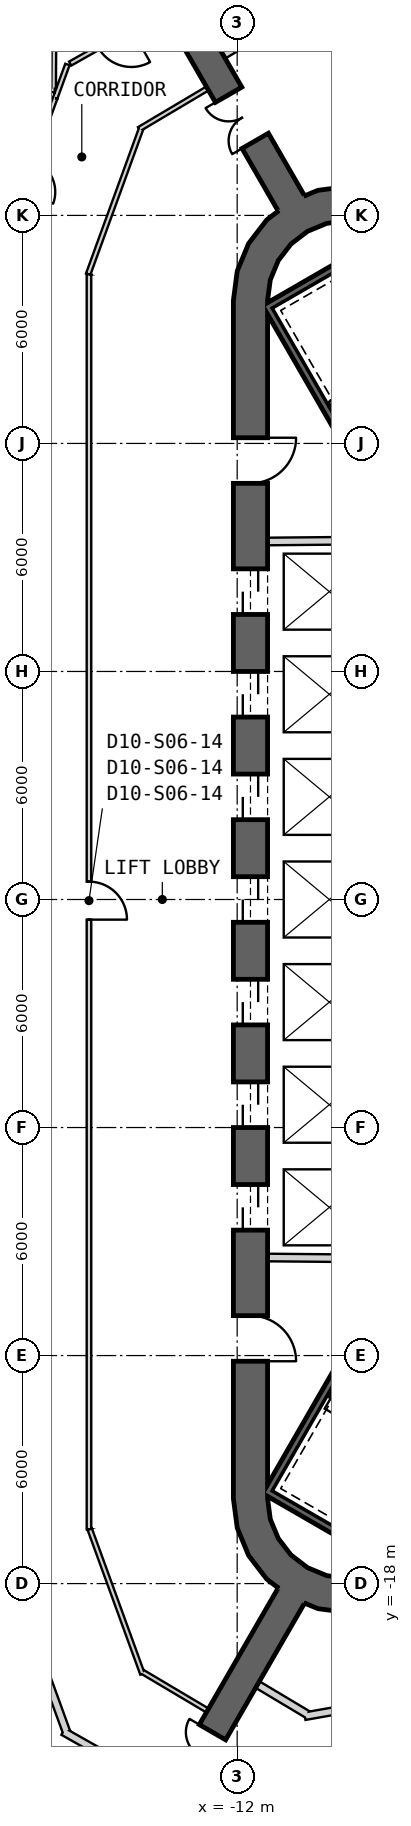
"""IFC4 building model, lengths in metres.
Left out: names, types, materials, properties, quantities, classifications, styles, units other than length and angle.
Written with IfcOpenShell. Run it as: python <this file> out.ifc"""

import sys

from ifc_helpers import new_model, si_unit, direction, frame, frame_2d, origin, place, context, subcontext, project, spatial, polyline, rectangle, outline, extrude, element, fill, save


model = new_model("IFC4")
c1 = context("Model", 3, precision=1e-05, world=origin(), true_north=direction((0.0, 1.0)))
c2 = subcontext(c1, "Body", "Model", "MODEL_VIEW")
j1 = project(units=[si_unit("LENGTHUNIT", "METRE"), si_unit("PLANEANGLEUNIT", "RADIAN")], contexts=[c1])
p1 = place(None, origin())
s1 = spatial("IfcSite", under=j1, at=p1, CompositionType="ELEMENT")
p2 = place(p1, origin())
s2 = spatial("IfcBuilding", under=s1, at=p2, CompositionType="ELEMENT")
p3 = place(p2, frame((0.0, 0.0, 119.3)))
s3 = spatial("IfcBuildingStorey", under=s2, at=p3, CompositionType="ELEMENT", Elevation=119.3)
p4 = place(p3, frame((-11.65, 15.762, 0.0), z_axis=(0.0, 0.0, 1.0), x_axis=(0.0, -1.0, 0.0)))
e1 = element("IfcWall", 1, at=p4, inside=s3, PredefinedType="SHEAR", context=c2, shape_type="SweptSolid", body=[
    extrude(rectangle(XDim=31.523, YDim=0.9, at=frame_2d((15.762, 0.0))), origin(), (0.0, 0.0, 1.0), 4.1),
])
p5 = place(p4, frame((7.062, 0.0, 0.0)))
e2 = element("IfcOpeningElement", 2, at=p5, cuts=e1, PredefinedType="OPENING", context=c2, shape_type="SweptSolid", body=[
    extrude(rectangle(XDim=1.2, YDim=2.4, at=frame_2d((0.6, 1.2))), frame((0.0, 0.46, 0.0), z_axis=(0.0, -1.0, 0.0), x_axis=(1.0, 0.0, 0.0)), (0.0, 0.0, 1.0), 0.92),
])
p6 = place(p4, frame((9.762, 0.0, 0.0)))
e3 = element("IfcOpeningElement", 3, at=p6, cuts=e1, PredefinedType="OPENING", context=c2, shape_type="SweptSolid", body=[
    extrude(rectangle(XDim=1.2, YDim=2.4, at=frame_2d((0.6, 1.2))), frame((0.0, 0.46, 0.0), z_axis=(0.0, -1.0, 0.0), x_axis=(1.0, 0.0, 0.0)), (0.0, 0.0, 1.0), 0.92),
])
p7 = place(p4, frame((12.462, 0.0, 0.0)))
e4 = element("IfcOpeningElement", 4, at=p7, cuts=e1, PredefinedType="OPENING", context=c2, shape_type="SweptSolid", body=[
    extrude(rectangle(XDim=1.2, YDim=2.4, at=frame_2d((0.6, 1.2))), frame((0.0, 0.46, 0.0), z_axis=(0.0, -1.0, 0.0), x_axis=(1.0, 0.0, 0.0)), (0.0, 0.0, 1.0), 0.92),
])
p8 = place(p4, frame((15.162, 0.0, 0.0)))
e5 = element("IfcOpeningElement", 5, at=p8, cuts=e1, PredefinedType="OPENING", context=c2, shape_type="SweptSolid", body=[
    extrude(rectangle(XDim=1.2, YDim=2.4, at=frame_2d((0.6, 1.2))), frame((0.0, 0.46, 0.0), z_axis=(0.0, -1.0, 0.0), x_axis=(1.0, 0.0, 0.0)), (0.0, 0.0, 1.0), 0.92),
])
p9 = place(p4, frame((17.862, 0.0, 0.0)))
e6 = element("IfcOpeningElement", 6, at=p9, cuts=e1, PredefinedType="OPENING", context=c2, shape_type="SweptSolid", body=[
    extrude(rectangle(XDim=1.2, YDim=2.4, at=frame_2d((0.6, 1.2))), frame((0.0, 0.46, 0.0), z_axis=(0.0, -1.0, 0.0), x_axis=(1.0, 0.0, 0.0)), (0.0, 0.0, 1.0), 0.92),
])
p10 = place(p4, frame((20.562, 0.0, 0.0)))
e7 = element("IfcOpeningElement", 7, at=p10, cuts=e1, PredefinedType="OPENING", context=c2, shape_type="SweptSolid", body=[
    extrude(rectangle(XDim=1.2, YDim=2.4, at=frame_2d((0.6, 1.2))), frame((0.0, 0.46, 0.0), z_axis=(0.0, -1.0, 0.0), x_axis=(1.0, 0.0, 0.0)), (0.0, 0.0, 1.0), 0.92),
])
p11 = place(p4, frame((23.262, 0.0, 0.0)))
e8 = element("IfcOpeningElement", 8, at=p11, cuts=e1, PredefinedType="OPENING", context=c2, shape_type="SweptSolid", body=[
    extrude(rectangle(XDim=1.2, YDim=2.4, at=frame_2d((0.6, 1.2))), frame((0.0, 0.46, 0.0), z_axis=(0.0, -1.0, 0.0), x_axis=(1.0, 0.0, 0.0)), (0.0, 0.0, 1.0), 0.92),
])
p12 = place(p4, frame((3.612, 0.0, 0.0)))
e9 = element("IfcOpeningElement", 9, at=p12, cuts=e1, PredefinedType="OPENING", context=c2, shape_type="SweptSolid", body=[
    extrude(rectangle(XDim=1.2, YDim=2.4, at=frame_2d((0.6, 1.2))), frame((0.0, 0.46, 0.0), z_axis=(0.0, -1.0, 0.0), x_axis=(1.0, 0.0, 0.0)), (0.0, 0.0, 1.0), 0.92),
])
p13 = place(p4, frame((26.712, 0.0, 0.0)))
e10 = element("IfcOpeningElement", 10, at=p13, cuts=e1, PredefinedType="OPENING", context=c2, shape_type="SweptSolid", body=[
    extrude(rectangle(XDim=1.2, YDim=2.4, at=frame_2d((0.6, 1.2))), frame((0.0, 0.46, 0.0), z_axis=(0.0, -1.0, 0.0), x_axis=(1.0, 0.0, 0.0)), (0.0, 0.0, 1.0), 0.92),
])
p14 = place(p3, origin())
e11 = element("IfcWall", 11, at=p14, inside=s3, PredefinedType="SHEAR", context=c2, shape_type="SweptSolid", body=[
    extrude(outline(polyline([(-7.6, 18.36), (-8.323, 18.659), (-9.1, 18.762), (-9.876, 18.659), (-10.6, 18.36), (-11.221, 17.883), (-11.698, 17.262), (-11.998, 16.538), (-12.1, 15.762), (-11.2, 15.762), (-11.128, 16.305), (-10.919, 16.812), (-10.585, 17.247), (-10.15, 17.58), (-9.644, 17.79), (-9.1, 17.862), (-8.556, 17.79), (-8.05, 17.58), (-7.6, 18.36)])), origin(), (0.0, 0.0, 1.0), 4.1),
])
p15 = place(p3, origin())
e12 = element("IfcWall", 12, at=p15, inside=s3, PredefinedType="SHEAR", context=c2, shape_type="SweptSolid", body=[
    extrude(outline(polyline([(-12.1, -15.762), (-11.998, -16.538), (-11.698, -17.262), (-11.221, -17.883), (-10.6, -18.36), (-9.876, -18.659), (-9.1, -18.762), (-8.323, -18.659), (-7.6, -18.36), (-8.05, -17.58), (-8.556, -17.79), (-9.1, -17.862), (-9.644, -17.79), (-10.15, -17.58), (-10.585, -17.247), (-10.919, -16.812), (-11.128, -16.305), (-11.2, -15.762), (-12.1, -15.762)])), origin(), (0.0, 0.0, 1.0), 4.1),
])
p16 = place(p3, frame((-10.575, 18.316, 0.0), z_axis=(0.0, 0.0, 1.0), x_axis=(-0.500008359956, 0.866020577108, 0.0)))
e13 = element("IfcWall", 13, at=p16, inside=s3, PredefinedType="SHEAR", context=c2, shape_type="SweptSolid", body=[
    extrude(rectangle(XDim=12.812, YDim=0.8, at=frame_2d((6.406, 0.0))), origin(), (0.0, 0.0, 1.0), 4.1),
])
p17 = place(p16, frame((1.9, 0.0, 0.0)))
e14 = element("IfcOpeningElement", 14, at=p17, cuts=e13, PredefinedType="OPENING", context=c2, shape_type="SweptSolid", body=[
    extrude(rectangle(XDim=1.4, YDim=2.4, at=frame_2d((0.7, 1.2))), frame((0.0, 0.41, 0.0), z_axis=(0.0, -1.0, 0.0), x_axis=(1.0, 0.0, 0.0)), (0.0, 0.0, 1.0), 0.82),
])
p18 = place(p3, frame((-10.575, -18.316, 0.0), z_axis=(0.0, 0.0, 1.0), x_axis=(-0.500008359956, -0.866020577108, 0.0)))
e15 = element("IfcWall", 15, at=p18, inside=s3, PredefinedType="SHEAR", context=c2, shape_type="SweptSolid", body=[
    extrude(rectangle(XDim=12.812, YDim=0.8, at=frame_2d((6.406, 0.0))), origin(), (0.0, 0.0, 1.0), 4.1),
])
p19 = place(p18, frame((4.15, 0.0, 0.0)))
e16 = element("IfcOpeningElement", 16, at=p19, cuts=e15, PredefinedType="OPENING", context=c2, shape_type="SweptSolid", body=[
    extrude(rectangle(XDim=1.4, YDim=2.4, at=frame_2d((0.7, 1.2))), frame((0.0, 0.41, 0.0), z_axis=(0.0, -1.0, 0.0), x_axis=(1.0, 0.0, 0.0)), (0.0, 0.0, 1.0), 0.82),
])
p20 = place(p3, frame((-11.2, 9.42, 0.0), z_axis=(0.0, 0.0, 1.0), x_axis=(0.999957167047, 0.009255488683, 0.0)))
e17 = element("IfcWall", 17, at=p20, inside=s3, PredefinedType="PLUMBINGWALL", context=c2, shape_type="SweptSolid", body=[
    extrude(rectangle(XDim=3.35, YDim=0.2, at=frame_2d((1.675, 0.0))), origin(), (0.0, 0.0, 1.0), 3.8),
])
p21 = place(p3, frame((-8.05, -9.449, 0.0), z_axis=(0.0, 0.0, 1.0), x_axis=(-0.999957467379, 0.009222983926, 0.0)))
e18 = element("IfcWall", 18, at=p21, inside=s3, PredefinedType="PLUMBINGWALL", context=c2, shape_type="SweptSolid", body=[
    extrude(rectangle(XDim=3.15, YDim=0.2, at=frame_2d((1.575, 0.0))), origin(), (0.0, 0.0, 1.0), 3.8),
])
p22 = place(p3, frame((-11.245, 15.678, -0.3), z_axis=(0.0, 0.0, 1.0), x_axis=(0.499977274689, -0.866038523851, 0.0)))
e19 = element("IfcWall", 19, at=p22, inside=s3, PredefinedType="SHEAR", context=c2, shape_type="SweptSolid", body=[
    extrude(rectangle(XDim=8.1, YDim=0.2, at=frame_2d((4.05, 0.0))), origin(), (0.0, 0.0, 1.0), 4.1),
])
for number, where, z_axis, x_axis in (
    (20, (-7.818, 17.541, -0.3), (0.0, 0.0, 1.0), (-0.866, -0.5, 0.0)),
    (21, (-11.282, -15.541, -0.3), (0.0, 0.0, 1.0), (0.866, -0.5, 0.0)),
):
    element("IfcWall", number, at=place(p3, frame(where, z_axis=z_axis, x_axis=x_axis)), inside=s3, PredefinedType="SHEAR", context=c2, shape_type="SweptSolid", body=[
        extrude(rectangle(XDim=3.8, YDim=0.2, at=frame_2d((1.9, 0.0))), origin(), (0.0, 0.0, 1.0), 4.1),
    ])
p23 = place(p3, frame((-7.196, -8.663, -0.3), z_axis=(0.0, 0.0, 1.0), x_axis=(-0.499997992926, -0.866026562566, 0.0)))
e22 = element("IfcWall", 22, at=p23, inside=s3, PredefinedType="SHEAR", context=c2, shape_type="SweptSolid", body=[
    extrude(rectangle(XDim=7.9, YDim=0.2, at=frame_2d((3.95, 0.0))), origin(), (0.0, 0.0, 1.0), 4.1),
])
p24 = place(p3, frame((-12.782, 21.339, 0.0), z_axis=(0.0, 0.0, 1.0), x_axis=(-0.859769901207, -0.510681619973, 0.0)))
e23 = element("IfcWall", 23, at=p24, inside=s3, PredefinedType="PARTITIONING", context=c2, shape_type="SweptSolid", body=[
    extrude(rectangle(XDim=2.093, YDim=0.12, at=frame_2d((1.046, 0.0))), origin(), (0.0, 0.0, 1.0), 3.8),
])
p25 = place(p3, frame((-14.528, 20.282, 0.0), z_axis=(0.0, 0.0, 1.0), x_axis=(-0.341969257767, -0.939711140054, 0.0)))
e24 = element("IfcWall", 24, at=p25, inside=s3, PredefinedType="PARTITIONING", context=c2, shape_type="SweptSolid", body=[
    extrude(rectangle(XDim=4.073, YDim=0.12, at=frame_2d((2.037, 0.0))), origin(), (0.0, 0.0, 1.0), 2.88),
])
p26 = place(p3, frame((-15.9, 16.451, 0.0), z_axis=(0.0, 0.0, 1.0), x_axis=(0.0, -1.0, 0.0)))
e25 = element("IfcWall", 25, at=p26, inside=s3, PredefinedType="PARTITIONING", context=c2, shape_type="SweptSolid", body=[
    extrude(rectangle(XDim=33.022, YDim=0.12, at=frame_2d((16.511, 0.0))), origin(), (0.0, 0.0, 1.0), 2.98),
])
p27 = place(p26, frame((15.981, 0.0, 0.0)))
e26 = element("IfcOpeningElement", 26, at=p27, cuts=e25, PredefinedType="OPENING", context=c2, shape_type="SweptSolid", body=[
    extrude(rectangle(XDim=1.0, YDim=2.1, at=frame_2d((0.5, 1.05))), frame((0.0, 0.07, 0.0), z_axis=(0.0, -1.0, 0.0), x_axis=(1.0, 0.0, 0.0)), (0.0, 0.0, 1.0), 0.14),
])
p28 = place(p3, frame((-15.879, -16.567, 0.0), z_axis=(0.0, 0.0, 1.0), x_axis=(0.341999322503, -0.939700198685, 0.0)))
e27 = element("IfcWall", 27, at=p28, inside=s3, PredefinedType="PARTITIONING", context=c2, shape_type="SweptSolid", body=[
    extrude(rectangle(XDim=4.054, YDim=0.12, at=frame_2d((2.027, 0.0))), origin(), (0.0, 0.0, 1.0), 2.88),
])
p29 = place(p3, frame((-14.494, -20.322, 0.0), z_axis=(0.0, 0.0, 1.0), x_axis=(0.859745408261, -0.510722853389, 0.0)))
e28 = element("IfcWall", 28, at=p29, inside=s3, PredefinedType="PARTITIONING", context=c2, shape_type="SweptSolid", body=[
    extrude(rectangle(XDim=1.991, YDim=0.12, at=frame_2d((0.996, 0.0))), origin(), (0.0, 0.0, 1.0), 3.8),
])
p30 = place(p3, frame((-16.576, -21.892, 0.0), z_axis=(0.0, 0.0, 1.0), x_axis=(0.870559817111, -0.492062602553, 0.0)))
e29 = element("IfcWall", 29, at=p30, inside=s3, PredefinedType="PARTITIONING", context=c2, shape_type="SweptSolid", body=[
    extrude(rectangle(XDim=3.01, YDim=0.2, at=frame_2d((1.505, 0.0))), origin(), (0.0, 0.0, 1.0), 3.8),
])
p31 = place(p3, frame((-18.334, -16.84, 0.0), z_axis=(0.0, 0.0, 1.0), x_axis=(0.342015877493, -0.939694173411, 0.0)))
e30 = element("IfcWall", 30, at=p31, inside=s3, PredefinedType="PARTITIONING", context=c2, shape_type="SweptSolid", body=[
    extrude(rectangle(XDim=5.389, YDim=0.2, at=frame_2d((2.694, 0.0))), origin(), (0.0, 0.0, 1.0), 2.88),
])
p32 = place(p3, frame((-16.467, 21.97, 0.0), z_axis=(0.0, 0.0, 1.0), x_axis=(-0.341973086836, -0.939709746613, 0.0)))
e31 = element("IfcWall", 31, at=p32, inside=s3, PredefinedType="PARTITIONING", context=c2, shape_type="SweptSolid", body=[
    extrude(rectangle(XDim=0.937, YDim=0.12, at=frame_2d((0.469, 0.0))), origin(), (0.0, 0.0, 1.0), 2.88),
])
p33 = place(p3, frame((-16.788, 21.09, 0.0), z_axis=(0.0, 0.0, 1.0), x_axis=(-0.342035154905, -0.939687156882, 0.0)))
e32 = element("IfcWall", 32, at=p33, inside=s3, PredefinedType="PARTITIONING", context=c2, shape_type="SweptSolid", body=[
    extrude(rectangle(XDim=4.362, YDim=0.12, at=frame_2d((2.181, 0.0))), origin(), (0.0, 0.0, 1.0), 2.98),
])
p34 = place(p33, frame((1.731, 0.0, 0.0)))
e33 = element("IfcOpeningElement", 33, at=p34, cuts=e32, PredefinedType="OPENING", context=c2, shape_type="SweptSolid", body=[
    extrude(rectangle(XDim=0.9, YDim=2.1, at=frame_2d((0.45, 1.05))), frame((0.0, 0.07, 0.0), z_axis=(0.0, -1.0, 0.0), x_axis=(1.0, 0.0, 0.0)), (0.0, 0.0, 1.0), 0.14),
])
p35 = place(p3, frame((-13.956, 23.373, 0.0), z_axis=(0.0, 0.0, 1.0), x_axis=(-0.870551471841, -0.492077366757, 0.0)))
e34 = element("IfcWall", 34, at=p35, inside=s3, PredefinedType="PARTITIONING", context=c2, shape_type="SweptSolid", body=[
    extrude(rectangle(XDim=2.8, YDim=0.12, at=frame_2d((1.4, 0.0))), origin(), (0.0, 0.0, 1.0), 3.8),
])
p36 = place(p35, frame((0.95, 0.0, 0.0)))
e35 = element("IfcOpeningElement", 35, at=p36, cuts=e34, PredefinedType="OPENING", context=c2, shape_type="SweptSolid", body=[
    extrude(rectangle(XDim=1.0, YDim=2.1, at=frame_2d((0.5, 1.05))), frame((0.0, 0.07, 0.0), z_axis=(0.0, -1.0, 0.0), x_axis=(1.0, 0.0, 0.0)), (0.0, 0.0, 1.0), 0.14),
])
p37 = place(p3, frame((-10.339, 23.415, 0.0), z_axis=(0.0, 0.0, 1.0), x_axis=(-0.860316803263, -0.509759745393, 0.0)))
e36 = element("IfcWall", 36, at=p37, inside=s3, PredefinedType="PARTITIONING", context=c2, shape_type="SweptSolid", body=[
    extrude(rectangle(XDim=2.354, YDim=0.2, at=frame_2d((1.177, 0.0))), origin(), (0.0, 0.0, 1.0), 3.8),
])
p38 = place(p3, frame((-10.22, -21.49, 0.0), z_axis=(0.0, 0.0, 1.0), x_axis=(0.984805188344, 0.173662721995, 0.0)))
e37 = element("IfcWall", 37, at=p38, inside=s3, PredefinedType="PARTITIONING", context=c2, shape_type="SweptSolid", body=[
    extrude(rectangle(XDim=3.408, YDim=0.2, at=frame_2d((1.704, 0.0))), origin(), (0.0, 0.0, 1.0), 2.88),
])
p39 = place(p3, frame((-11.465, -20.657, 0.0), z_axis=(0.0, 0.0, 1.0), x_axis=(0.858376755127, -0.513019830276, 0.0)))
e38 = element("IfcWall", 38, at=p39, inside=s3, PredefinedType="PARTITIONING", context=c2, shape_type="SweptSolid", body=[
    extrude(rectangle(XDim=1.533, YDim=0.2, at=frame_2d((0.767, 0.0))), origin(), (0.0, 0.0, 1.0), 3.8),
])
p40 = place(p3, frame((-16.8, 21.302, 0.0), z_axis=(0.0, 0.0, 1.0), x_axis=(-1.0, 0.0, 0.0)))
e39 = element("IfcWall", 39, at=p40, inside=s3, PredefinedType="PARTITIONING", context=c2, shape_type="SweptSolid", body=[
    extrude(rectangle(XDim=5.95, YDim=0.12, at=frame_2d((2.975, 0.0))), origin(), (0.0, 0.0, 1.0), 2.98),
])
p41 = place(p40, frame((2.525, 0.0, 0.0)))
e40 = element("IfcOpeningElement", 40, at=p41, cuts=e39, PredefinedType="OPENING", context=c2, shape_type="SweptSolid", body=[
    extrude(rectangle(XDim=0.9, YDim=2.1, at=frame_2d((0.45, 1.05))), frame((0.0, 0.07, 0.0), z_axis=(0.0, -1.0, 0.0), x_axis=(1.0, 0.0, 0.0)), (0.0, 0.0, 1.0), 0.14),
])
p42 = place(p3, frame((-16.83, 21.332, 0.0), z_axis=(0.0, 0.0, 1.0), x_axis=(0.006971081403, 0.999975701717, 0.0)))
e41 = element("IfcWall", 41, at=p42, inside=s3, PredefinedType="PARTITIONING", context=c2, shape_type="SweptSolid", body=[
    extrude(rectangle(XDim=4.238, YDim=0.12, at=frame_2d((2.119, 0.0))), origin(), (0.0, 0.0, 1.0), 2.88),
])
p43 = place(p27, origin())
e42 = element("IfcDoor", 42, at=p43, inside=s3, OperationType="SINGLE_SWING_RIGHT", PredefinedType="NOTDEFINED", context=c2, shape_type="SweptSolid", body=[
    extrude(rectangle(XDim=1.0, YDim=2.1, at=frame_2d((0.5, 1.05))), frame((0.0, 0.025, 0.0), z_axis=(0.0, -1.0, 0.0), x_axis=(1.0, 0.0, 0.0)), (0.0, 0.0, 1.0), 0.05),
])
fill(e26, e42)
p44 = place(p5, origin())
e43 = element("IfcDoor", 43, at=p44, inside=s3, OperationType="SLIDING_TO_LEFT", PredefinedType="USERDEFINED", context=c2, shape_type="SweptSolid", body=[
    extrude(rectangle(XDim=1.2, YDim=2.4, at=frame_2d((0.6, 1.2))), frame((0.0, 0.025, 0.0), z_axis=(0.0, -1.0, 0.0), x_axis=(1.0, 0.0, 0.0)), (0.0, 0.0, 1.0), 0.05),
])
fill(e2, e43)
p45 = place(p6, origin())
e44 = element("IfcDoor", 44, at=p45, inside=s3, OperationType="SLIDING_TO_LEFT", PredefinedType="USERDEFINED", context=c2, shape_type="SweptSolid", body=[
    extrude(rectangle(XDim=1.2, YDim=2.4, at=frame_2d((0.6, 1.2))), frame((0.0, 0.025, 0.0), z_axis=(0.0, -1.0, 0.0), x_axis=(1.0, 0.0, 0.0)), (0.0, 0.0, 1.0), 0.05),
])
fill(e3, e44)
p46 = place(p7, origin())
e45 = element("IfcDoor", 45, at=p46, inside=s3, OperationType="SLIDING_TO_LEFT", PredefinedType="USERDEFINED", context=c2, shape_type="SweptSolid", body=[
    extrude(rectangle(XDim=1.2, YDim=2.4, at=frame_2d((0.6, 1.2))), frame((0.0, 0.025, 0.0), z_axis=(0.0, -1.0, 0.0), x_axis=(1.0, 0.0, 0.0)), (0.0, 0.0, 1.0), 0.05),
])
fill(e4, e45)
p47 = place(p8, origin())
e46 = element("IfcDoor", 46, at=p47, inside=s3, OperationType="SLIDING_TO_LEFT", PredefinedType="USERDEFINED", context=c2, shape_type="SweptSolid", body=[
    extrude(rectangle(XDim=1.2, YDim=2.4, at=frame_2d((0.6, 1.2))), frame((0.0, 0.025, 0.0), z_axis=(0.0, -1.0, 0.0), x_axis=(1.0, 0.0, 0.0)), (0.0, 0.0, 1.0), 0.05),
])
fill(e5, e46)
p48 = place(p9, origin())
e47 = element("IfcDoor", 47, at=p48, inside=s3, OperationType="SLIDING_TO_LEFT", PredefinedType="USERDEFINED", context=c2, shape_type="SweptSolid", body=[
    extrude(rectangle(XDim=1.2, YDim=2.4, at=frame_2d((0.6, 1.2))), frame((0.0, 0.025, 0.0), z_axis=(0.0, -1.0, 0.0), x_axis=(1.0, 0.0, 0.0)), (0.0, 0.0, 1.0), 0.05),
])
fill(e6, e47)
p49 = place(p10, origin())
e48 = element("IfcDoor", 48, at=p49, inside=s3, OperationType="SLIDING_TO_LEFT", PredefinedType="USERDEFINED", context=c2, shape_type="SweptSolid", body=[
    extrude(rectangle(XDim=1.2, YDim=2.4, at=frame_2d((0.6, 1.2))), frame((0.0, 0.025, 0.0), z_axis=(0.0, -1.0, 0.0), x_axis=(1.0, 0.0, 0.0)), (0.0, 0.0, 1.0), 0.05),
])
fill(e7, e48)
p50 = place(p11, origin())
e49 = element("IfcDoor", 49, at=p50, inside=s3, OperationType="SLIDING_TO_LEFT", PredefinedType="USERDEFINED", context=c2, shape_type="SweptSolid", body=[
    extrude(rectangle(XDim=1.2, YDim=2.4, at=frame_2d((0.6, 1.2))), frame((0.0, 0.025, 0.0), z_axis=(0.0, -1.0, 0.0), x_axis=(1.0, 0.0, 0.0)), (0.0, 0.0, 1.0), 0.05),
])
fill(e8, e49)
p51 = place(p12, origin())
e50 = element("IfcDoor", 50, at=p51, inside=s3, OperationType="SINGLE_SWING_RIGHT", PredefinedType="USERDEFINED", context=c2, shape_type="SweptSolid", body=[
    extrude(rectangle(XDim=1.2, YDim=2.4, at=frame_2d((0.6, 1.2))), frame((0.0, 0.025, 0.0), z_axis=(0.0, -1.0, 0.0), x_axis=(1.0, 0.0, 0.0)), (0.0, 0.0, 1.0), 0.05),
])
fill(e9, e50)
p52 = place(p13, origin())
e51 = element("IfcDoor", 51, at=p52, inside=s3, OperationType="SINGLE_SWING_RIGHT", PredefinedType="USERDEFINED", context=c2, shape_type="SweptSolid", body=[
    extrude(rectangle(XDim=1.2, YDim=2.4, at=frame_2d((0.6, 1.2))), frame((0.0, 0.025, 0.0), z_axis=(0.0, -1.0, 0.0), x_axis=(1.0, 0.0, 0.0)), (0.0, 0.0, 1.0), 0.05),
])
fill(e10, e51)
p53 = place(p17, origin())
e52 = element("IfcDoor", 52, at=p53, inside=s3, OperationType="DOUBLE_DOOR_SINGLE_SWING", PredefinedType="NOTDEFINED", context=c2, shape_type="SweptSolid", body=[
    extrude(rectangle(XDim=1.4, YDim=2.4, at=frame_2d((0.7, 1.2))), frame((0.0, 0.025, 0.0), z_axis=(0.0, -1.0, 0.0), x_axis=(1.0, 0.0, 0.0)), (0.0, 0.0, 1.0), 0.05),
])
fill(e14, e52)
p54 = place(p19, origin())
e53 = element("IfcDoor", 53, at=p54, inside=s3, OperationType="DOUBLE_DOOR_SINGLE_SWING", PredefinedType="NOTDEFINED", context=c2, shape_type="SweptSolid", body=[
    extrude(rectangle(XDim=1.4, YDim=2.4, at=frame_2d((0.7, 1.2))), frame((0.0, 0.025, 0.0), z_axis=(0.0, -1.0, 0.0), x_axis=(1.0, 0.0, 0.0)), (0.0, 0.0, 1.0), 0.05),
])
fill(e16, e53)
save(model, sys.argv[1])
